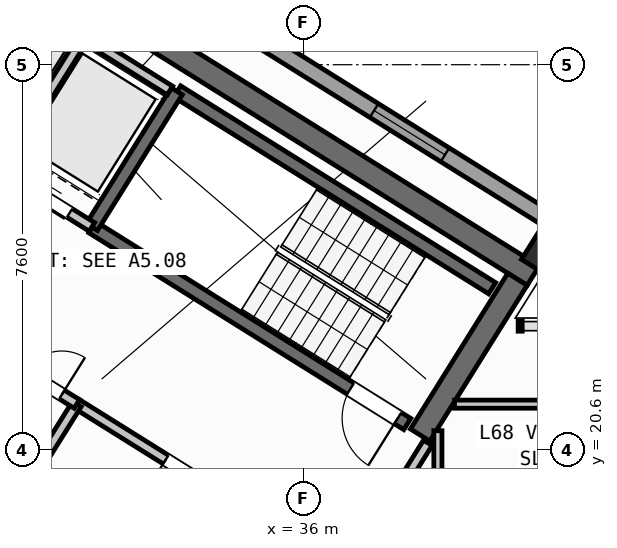
"""IFC4 building model, lengths in metres.
Left out: names, types, materials, properties, quantities, classifications, styles, units other than length and angle.
Written with IfcOpenShell. Run it as: python <this file> out.ifc"""

import sys

from ifc_helpers import new_model, si_unit, direction, frame, frame_2d, origin, origin_2d, place, context, subcontext, project, spatial, rectangle, hollow_rectangle, extrude, source, transform, mapped, element, fill, save


model = new_model("IFC4")
c1 = context("Model", 3, precision=1e-05, world=origin(), true_north=direction((0.0, 1.0)))
c2 = subcontext(c1, "Body", "Model", "MODEL_VIEW")
j1 = project(units=[si_unit("LENGTHUNIT", "METRE"), si_unit("PLANEANGLEUNIT", "RADIAN")], contexts=[c1])
p1 = place(None, origin())
s1 = spatial("IfcSite", under=j1, at=p1, CompositionType="ELEMENT")
p2 = place(p1, origin())
s2 = spatial("IfcBuilding", under=s1, at=p2, CompositionType="ELEMENT")
p3 = place(p2, frame((0.0, 0.0, 270.0)))
s3 = spatial("IfcBuildingStorey", under=s2, at=p3, CompositionType="ELEMENT", Elevation=270.0)
p4 = place(p3, frame((40.531, 24.036, 0.0), z_axis=(0.0, 0.0, 1.0), x_axis=(-0.848048787466, 0.529918157905, 0.0)))
e1 = element("IfcWall", 1, at=p4, inside=s3, PredefinedType="SHEAR", context=c2, shape_type="SweptSolid", body=[
    extrude(rectangle(XDim=13.04, YDim=0.45, at=frame_2d((6.52, 0.0))), origin(), (0.0, 0.0, 1.0), 3.35),
])
p5 = place(p3, frame((40.221, 23.965, 0.0), z_axis=(0.0, 0.0, 1.0), x_axis=(-0.529902075036, -0.848058836916, 0.0)))
e2 = element("IfcWall", 2, at=p5, inside=s3, PredefinedType="SHEAR", context=c2, shape_type="SweptSolid", body=[
    extrude(rectangle(XDim=3.625, YDim=0.45, at=frame_2d((1.812, 0.0))), origin(), (0.0, 0.0, 1.0), 3.35),
])
m1 = source(origin(), c2, "Body", "SweptSolid", [
    extrude(hollow_rectangle(XDim=0.7, YDim=0.7, WallThickness=0.028, at=origin_2d()), origin(), (0.0, 0.0, 1.0), 3.6),
])
p6 = place(p3, frame((40.783, 24.469, 0.0), z_axis=(0.0, 0.0, 1.0), x_axis=(-0.848048096156, 0.529919264233, 0.0)))
e3 = element("IfcColumn", 3, at=p6, inside=s3, PredefinedType="COLUMN", context=c2, shape_type="MappedRepresentation", body=[
    mapped(m1, transform((0.0, 0.0, 0.0), scale=1.0)),
])
p7 = place(p3, frame((14.138, 41.825, 0.0), z_axis=(0.0, 0.0, 1.0), x_axis=(0.848046498049, -0.529921821731, 0.0)))
e4 = element("IfcWall", 4, at=p7, inside=s3, PredefinedType="STANDARD", context=c2, shape_type="SweptSolid", body=[
    extrude(rectangle(XDim=31.588, YDim=0.32, at=frame_2d((15.794, 0.0))), origin(), (0.0, 0.0, 1.0), 3.35),
])
p8 = place(p7, frame((3.46, 0.0, 0.0)))
e5 = element("IfcOpeningElement", 5, at=p8, cuts=e4, PredefinedType="OPENING", context=c2, shape_type="SweptSolid", body=[
    extrude(rectangle(XDim=1.05, YDim=2.15, at=frame_2d((0.525, 1.075))), frame((0.0, 0.17, 0.0), z_axis=(0.0, -1.0, 0.0), x_axis=(1.0, 0.0, 0.0)), (0.0, 0.0, 1.0), 0.34),
])
p9 = place(p7, frame((0.831, 0.0, 1.0)))
e6 = element("IfcOpeningElement", 6, at=p9, cuts=e4, PredefinedType="OPENING", context=c2, shape_type="SweptSolid", body=[
    extrude(rectangle(XDim=0.9, YDim=1.25, at=frame_2d((0.45, 0.625))), frame((0.0, 0.17, 0.0), z_axis=(0.0, -1.0, 0.0), x_axis=(1.0, 0.0, 0.0)), (0.0, 0.0, 1.0), 0.34),
])
p10 = place(p7, frame((8.719, 0.0, 0.9)))
e7 = element("IfcOpeningElement", 7, at=p10, cuts=e4, PredefinedType="OPENING", context=c2, shape_type="SweptSolid", body=[
    extrude(rectangle(XDim=1.35, YDim=1.45, at=frame_2d((0.675, 0.725))), frame((0.0, 0.17, 0.0), z_axis=(0.0, -1.0, 0.0), x_axis=(1.0, 0.0, 0.0)), (0.0, 0.0, 1.0), 0.34),
])
p11 = place(p7, frame((13.599, 0.0, 0.95)))
e8 = element("IfcOpeningElement", 8, at=p11, cuts=e4, PredefinedType="OPENING", context=c2, shape_type="SweptSolid", body=[
    extrude(rectangle(XDim=1.95, YDim=1.35, at=frame_2d((0.975, 0.675))), frame((0.0, 0.17, 0.0), z_axis=(0.0, -1.0, 0.0), x_axis=(1.0, 0.0, 0.0)), (0.0, 0.0, 1.0), 0.34),
])
p12 = place(p7, frame((17.154, 0.0, 1.0)))
e9 = element("IfcOpeningElement", 9, at=p12, cuts=e4, PredefinedType="OPENING", context=c2, shape_type="SweptSolid", body=[
    extrude(rectangle(XDim=0.9, YDim=1.25, at=frame_2d((0.45, 0.625))), frame((0.0, 0.17, 0.0), z_axis=(0.0, -1.0, 0.0), x_axis=(1.0, 0.0, 0.0)), (0.0, 0.0, 1.0), 0.34),
])
p13 = place(p7, frame((21.719, 0.0, 0.9)))
e10 = element("IfcOpeningElement", 10, at=p13, cuts=e4, PredefinedType="OPENING", context=c2, shape_type="SweptSolid", body=[
    extrude(rectangle(XDim=1.65, YDim=1.45, at=frame_2d((0.825, 0.725))), frame((0.0, 0.17, 0.0), z_axis=(0.0, -1.0, 0.0), x_axis=(1.0, 0.0, 0.0)), (0.0, 0.0, 1.0), 0.34),
])
p14 = place(p7, frame((27.419, 0.0, 0.9)))
e11 = element("IfcOpeningElement", 11, at=p14, cuts=e4, PredefinedType="OPENING", context=c2, shape_type="SweptSolid", body=[
    extrude(rectangle(XDim=1.65, YDim=1.45, at=frame_2d((0.825, 0.725))), frame((0.0, 0.17, 0.0), z_axis=(0.0, -1.0, 0.0), x_axis=(1.0, 0.0, 0.0)), (0.0, 0.0, 1.0), 0.34),
])
p15 = place(p3, frame((31.28, 18.261, 0.0), z_axis=(0.0, 0.0, 1.0), x_axis=(-0.848051618787, 0.529913626805, 0.0)))
e12 = element("IfcWall", 12, at=p15, inside=s3, PredefinedType="SHEAR", context=c2, shape_type="SweptSolid", body=[
    extrude(rectangle(XDim=7.46, YDim=0.26, at=frame_2d((3.73, 0.0))), origin(), (0.0, 0.0, 1.0), 3.35),
])
p16 = place(p15, frame((0.36, 0.0, 0.0)))
e13 = element("IfcOpeningElement", 13, at=p16, cuts=e12, PredefinedType="OPENING", context=c2, shape_type="SweptSolid", body=[
    extrude(rectangle(XDim=0.86, YDim=2.05, at=frame_2d((0.43, 1.025))), frame((0.0, 0.14, 0.0), z_axis=(0.0, -1.0, 0.0), x_axis=(1.0, 0.0, 0.0)), (0.0, 0.0, 1.0), 0.28),
])
p17 = place(p3, frame((39.721, 23.788, 0.0), z_axis=(0.0, 0.0, 1.0), x_axis=(-0.848054434086, 0.529909121291, 0.0)))
e14 = element("IfcWall", 14, at=p17, inside=s3, PredefinedType="SHEAR", context=c2, shape_type="SweptSolid", body=[
    extrude(rectangle(XDim=7.33, YDim=0.26, at=frame_2d((3.665, 0.0))), origin(), (0.0, 0.0, 1.0), 3.35),
])
p18 = place(p3, frame((38.046, 21.108, 0.0), z_axis=(0.0, 0.0, 1.0), x_axis=(-0.848054434086, 0.529909121291, 0.0)))
e15 = element("IfcWall", 15, at=p18, inside=s3, PredefinedType="SHEAR", context=c2, shape_type="SweptSolid", body=[
    extrude(rectangle(XDim=7.33, YDim=0.26, at=frame_2d((3.665, 0.0))), origin(), (0.0, 0.0, 1.0), 3.35),
])
p19 = place(p18, frame((0.22, 0.0, 0.0)))
e16 = element("IfcOpeningElement", 16, at=p19, cuts=e15, PredefinedType="OPENING", context=c2, shape_type="SweptSolid", body=[
    extrude(rectangle(XDim=1.1, YDim=2.1, at=frame_2d((0.55, 1.05))), frame((0.0, 0.14, 0.0), z_axis=(0.0, -1.0, 0.0), x_axis=(1.0, 0.0, 0.0)), (0.0, 0.0, 1.0), 0.28),
])
p20 = place(p3, frame((33.496, 27.677, 0.0), z_axis=(0.0, 0.0, 1.0), x_axis=(-0.529908658664, -0.84805472316, 0.0)))
e17 = element("IfcWall", 17, at=p20, inside=s3, PredefinedType="SHEAR", context=c2, shape_type="SweptSolid", body=[
    extrude(rectangle(XDim=3.16, YDim=0.26, at=frame_2d((1.58, 0.0))), origin(), (0.0, 0.0, 1.0), 3.35),
])
p21 = place(p3, frame((36.459, 18.421, 0.0), z_axis=(0.0, 0.0, 1.0), x_axis=(-0.848059591691, 0.529900867089, 0.0)))
e18 = element("IfcWall", 18, at=p21, inside=s3, PredefinedType="STANDARD", context=c2, shape_type="SweptSolid", body=[
    extrude(rectangle(XDim=5.818, YDim=0.2, at=frame_2d((2.909, 0.0))), origin(), (0.0, 0.0, 1.0), 3.34),
])
p22 = place(p21, frame((2.598, 0.0, 0.0)))
e19 = element("IfcOpeningElement", 19, at=p22, cuts=e18, PredefinedType="OPENING", context=c2, shape_type="SweptSolid", body=[
    extrude(rectangle(XDim=1.15, YDim=2.1, at=frame_2d((0.575, 1.05))), frame((0.0, 0.11, 0.0), z_axis=(0.0, -1.0, 0.0), x_axis=(1.0, 0.0, 0.0)), (0.0, 0.0, 1.0), 0.22),
])
p23 = place(p3, frame((31.822, 24.998, 0.0), z_axis=(0.0, 0.0, 1.0), x_axis=(-0.848054125777, 0.529909614701, 0.0)))
e20 = element("IfcWall", 20, at=p23, inside=s3, PredefinedType="STANDARD", context=c2, shape_type="SweptSolid", body=[
    extrude(rectangle(XDim=4.668, YDim=0.2, at=frame_2d((2.334, 0.0))), origin(), (0.0, 0.0, 1.0), 3.34),
])
p24 = place(p23, frame((0.52, 0.0, 0.0)))
e21 = element("IfcOpeningElement", 21, at=p24, cuts=e20, PredefinedType="OPENING", context=c2, shape_type="SweptSolid", body=[
    extrude(rectangle(XDim=1.2, YDim=2.15, at=frame_2d((0.6, 1.075))), frame((0.0, 0.11, 0.0), z_axis=(0.0, -1.0, 0.0), x_axis=(1.0, 0.0, 0.0)), (0.0, 0.0, 1.0), 0.22),
])
p25 = place(p23, frame((2.54, 0.0, 0.0)))
e22 = element("IfcOpeningElement", 22, at=p25, cuts=e20, PredefinedType="OPENING", context=c2, shape_type="SweptSolid", body=[
    extrude(rectangle(XDim=1.2, YDim=2.15, at=frame_2d((0.6, 1.075))), frame((0.0, 0.11, 0.0), z_axis=(0.0, -1.0, 0.0), x_axis=(1.0, 0.0, 0.0)), (0.0, 0.0, 1.0), 0.22),
])
p26 = place(p3, frame((31.645, 28.716, 0.0), z_axis=(0.0, 0.0, 1.0), x_axis=(-0.52986693015, -0.848080795876, 0.0)))
e23 = element("IfcWall", 23, at=p26, inside=s3, PredefinedType="STANDARD", context=c2, shape_type="SweptSolid", body=[
    extrude(rectangle(XDim=2.66, YDim=0.2, at=frame_2d((1.33, 0.0))), origin(), (0.0, 0.0, 1.0), 3.34),
])
p27 = place(p3, frame((33.363, 27.69, 0.0), z_axis=(0.0, 0.0, 1.0), x_axis=(-0.84804957148, 0.529916903215, 0.0)))
e24 = element("IfcWall", 24, at=p27, inside=s3, PredefinedType="STANDARD", context=c2, shape_type="SweptSolid", body=[
    extrude(rectangle(XDim=4.548, YDim=0.2, at=frame_2d((2.274, 0.0))), origin(), (0.0, 0.0, 1.0), 3.34),
])
p28 = place(p3, frame((31.525, 21.504, 0.0), z_axis=(0.0, 0.0, 1.0), x_axis=(-0.529907497854, -0.848055448493, 0.0)))
e25 = element("IfcWall", 25, at=p28, inside=s3, PredefinedType="STANDARD", context=c2, shape_type="SweptSolid", body=[
    extrude(rectangle(XDim=2.88, YDim=0.2, at=frame_2d((1.44, 0.0))), origin(), (0.0, 0.0, 1.0), 3.34),
])
p29 = place(p3, frame((31.525, 21.504, 0.0), z_axis=(0.0, 0.0, 1.0), x_axis=(-0.848042066329, 0.529928913853, 0.0)))
e26 = element("IfcWall", 26, at=p29, inside=s3, PredefinedType="STANDARD", context=c2, shape_type="SweptSolid", body=[
    extrude(rectangle(XDim=6.268, YDim=0.2, at=frame_2d((3.134, 0.0))), origin(), (0.0, 0.0, 1.0), 3.34),
])
p30 = place(p29, frame((4.4, 0.0, 0.0)))
e27 = element("IfcOpeningElement", 27, at=p30, cuts=e26, PredefinedType="OPENING", context=c2, shape_type="SweptSolid", body=[
    extrude(rectangle(XDim=0.86, YDim=2.05, at=frame_2d((0.43, 1.025))), frame((0.0, 0.11, 0.0), z_axis=(0.0, -1.0, 0.0), x_axis=(1.0, 0.0, 0.0)), (0.0, 0.0, 1.0), 0.22),
])
p31 = place(p29, frame((0.35, 0.0, 0.0)))
e28 = element("IfcOpeningElement", 28, at=p31, cuts=e26, PredefinedType="OPENING", context=c2, shape_type="SweptSolid", body=[
    extrude(rectangle(XDim=0.86, YDim=2.05, at=frame_2d((0.43, 1.025))), frame((0.0, 0.11, 0.0), z_axis=(0.0, -1.0, 0.0), x_axis=(1.0, 0.0, 0.0)), (0.0, 0.0, 1.0), 0.22),
])
p32 = place(p3, frame((38.451, 20.737, 0.0), z_axis=(0.0, 0.0, 1.0), x_axis=(-0.529924799939, -0.848044637038, 0.0)))
e29 = element("IfcWall", 29, at=p32, inside=s3, PredefinedType="STANDARD", context=c2, shape_type="SweptSolid", body=[
    extrude(rectangle(XDim=2.96, YDim=0.2, at=frame_2d((1.48, 0.0))), origin(), (0.0, 0.0, 1.0), 3.34),
])
p33 = place(p32, frame((1.46, 0.0, 0.0)))
e30 = element("IfcOpeningElement", 30, at=p33, cuts=e29, PredefinedType="OPENING", context=c2, shape_type="SweptSolid", body=[
    extrude(rectangle(XDim=0.86, YDim=2.05, at=frame_2d((0.43, 1.025))), frame((0.0, 0.11, 0.0), z_axis=(0.0, -1.0, 0.0), x_axis=(1.0, 0.0, 0.0)), (0.0, 0.0, 1.0), 0.22),
])
p34 = place(p3, frame((38.65, 17.93, 0.0), z_axis=(0.0, 0.0, 1.0), x_axis=(0.0, 1.0, 0.0)))
e31 = element("IfcWall", 31, at=p34, inside=s3, PredefinedType="PARTITIONING", context=c2, shape_type="SweptSolid", body=[
    extrude(rectangle(XDim=3.046, YDim=0.16, at=frame_2d((1.523, 0.0))), origin(), (0.0, 0.0, 1.0), 3.34),
])
p35 = place(p3, frame((38.978, 21.5, 0.0), z_axis=(0.0, 0.0, 1.0), x_axis=(1.0, 0.0, 0.0)))
e32 = element("IfcWall", 32, at=p35, inside=s3, PredefinedType="PARTITIONING", context=c2, shape_type="SweptSolid", body=[
    extrude(rectangle(XDim=3.823, YDim=0.16, at=frame_2d((1.911, 0.0))), origin(), (0.0, 0.0, 1.0), 3.34),
])
m2 = source(origin(), c2, "Body", "SweptSolid", [
    extrude(rectangle(XDim=1.65, YDim=1.45, at=frame_2d((0.825, 0.725))), frame((0.0, 0.03, 0.0), z_axis=(0.0, -1.0, 0.0), x_axis=(1.0, 0.0, 0.0)), (0.0, 0.0, 1.0), 0.06),
])
p36 = place(p14, origin())
e33 = element("IfcWindow", 33, at=p36, inside=s3, PartitioningType="SINGLE_PANEL", PredefinedType="WINDOW", context=c2, shape_type="MappedRepresentation", body=[
    mapped(m2, transform((0.0, 0.0, 0.0), scale=1.0)),
])
fill(e11, e33)
m3 = source(origin(), c2, "Body", "SweptSolid", [
    extrude(rectangle(XDim=1.1, YDim=2.1, at=frame_2d((0.55, 1.05))), frame((0.0, 0.025, 0.0), z_axis=(0.0, -1.0, 0.0), x_axis=(1.0, 0.0, 0.0)), (0.0, 0.0, 1.0), 0.05),
])
p37 = place(p19, origin())
e34 = element("IfcDoor", 34, at=p37, inside=s3, OperationType="SINGLE_SWING_LEFT", PredefinedType="DOOR", context=c2, shape_type="MappedRepresentation", body=[
    mapped(m3, transform((0.0, 0.0, 0.0), scale=1.0)),
])
fill(e16, e34)
m4 = source(origin(), c2, "Body", "SweptSolid", [
    extrude(rectangle(XDim=1.15, YDim=2.1, at=frame_2d((0.575, 1.05))), frame((0.0, 0.025, 0.0), z_axis=(0.0, -1.0, 0.0), x_axis=(1.0, 0.0, 0.0)), (0.0, 0.0, 1.0), 0.05),
])
p38 = place(p22, origin())
e35 = element("IfcDoor", 35, at=p38, inside=s3, OperationType="SINGLE_SWING_RIGHT", PredefinedType="DOOR", context=c2, shape_type="MappedRepresentation", body=[
    mapped(m4, transform((0.0, 0.0, 0.0), scale=1.0)),
])
fill(e19, e35)
m5 = source(origin(), c2, "Body", "SweptSolid", [
    extrude(rectangle(XDim=1.2, YDim=2.15, at=frame_2d((0.6, 1.075))), frame((0.0, 0.025, 0.0), z_axis=(0.0, -1.0, 0.0), x_axis=(1.0, 0.0, 0.0)), (0.0, 0.0, 1.0), 0.05),
])
p39 = place(p24, origin())
e36 = element("IfcDoor", 36, at=p39, inside=s3, OperationType="DOUBLE_DOOR_SLIDING", PredefinedType="DOOR", context=c2, shape_type="MappedRepresentation", body=[
    mapped(m5, transform((0.0, 0.0, 0.0), scale=1.0)),
])
fill(e21, e36)
m6 = source(origin(), c2, "Body", "SweptSolid", [
    extrude(rectangle(XDim=0.86, YDim=2.05, at=frame_2d((0.43, 1.025))), frame((0.0, 0.025, 0.0), z_axis=(0.0, -1.0, 0.0), x_axis=(1.0, 0.0, 0.0)), (0.0, 0.0, 1.0), 0.05),
])
p40 = place(p31, frame((0.86, 0.0, 0.0), z_axis=(0.0, 0.0, 1.0), x_axis=(-1.0, 0.0, 0.0)))
e37 = element("IfcDoor", 37, at=p40, inside=s3, OperationType="SINGLE_SWING_RIGHT", PredefinedType="DOOR", context=c2, shape_type="MappedRepresentation", body=[
    mapped(m6, transform((0.0, 0.0, 0.0), scale=1.0)),
])
fill(e28, e37)
save(model, sys.argv[1])
